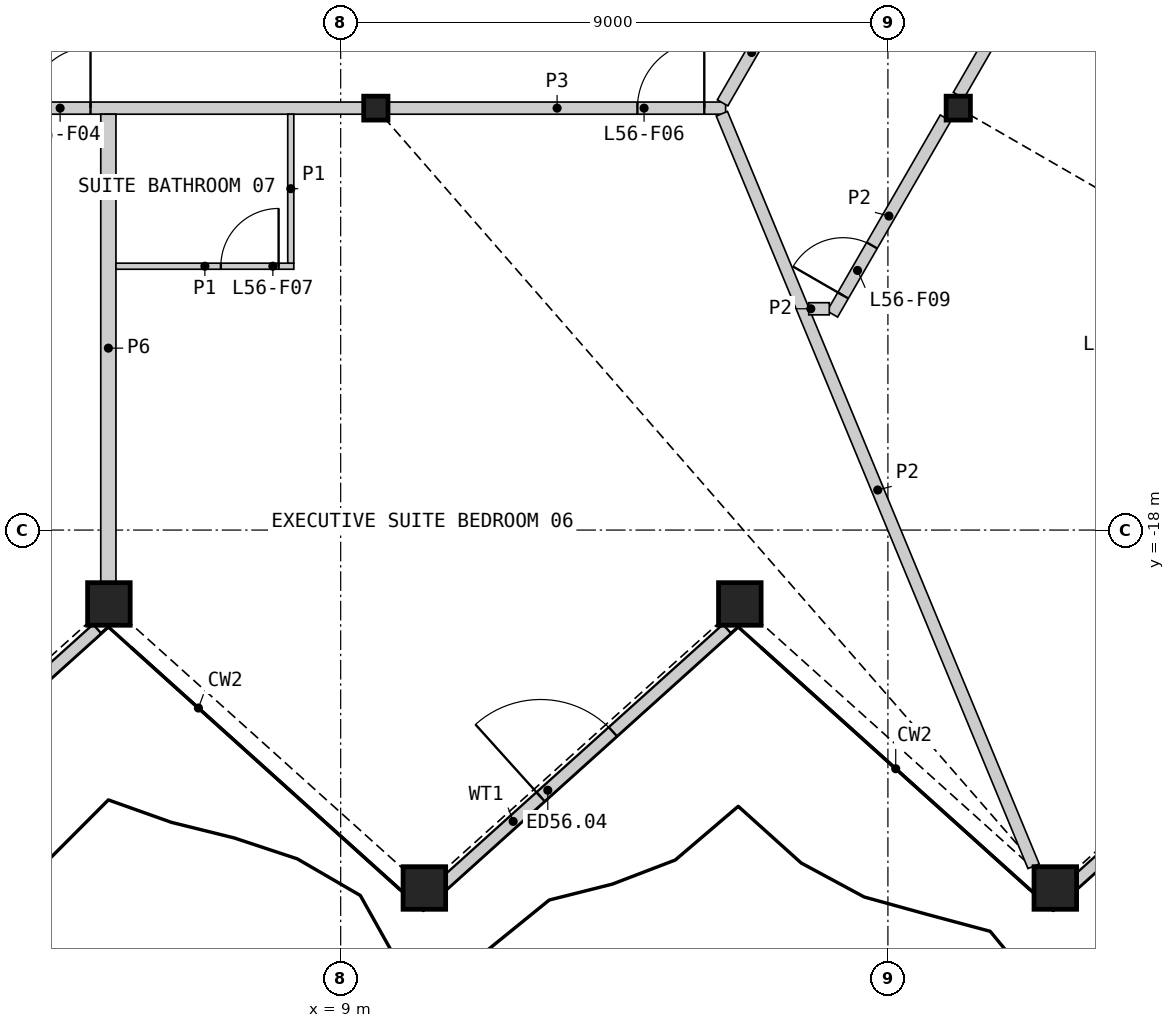
"""IFC4 building model, lengths in metres.
Left out: names, types, materials, properties, quantities, classifications, styles, units other than length and angle.
Written with IfcOpenShell. Run it as: python <this file> out.ifc"""

import sys

from ifc_helpers import new_model, si_unit, direction, frame, frame_2d, origin, origin_2d, place, context, subcontext, project, spatial, rectangle, hollow_rectangle, i_section, extrude, element, fill, save


model = new_model("IFC4")
c1 = context("Model", 3, precision=1e-05, world=origin(), true_north=direction((0.0, 1.0)))
c2 = subcontext(c1, "Body", "Model", "MODEL_VIEW")
j1 = project(units=[si_unit("LENGTHUNIT", "METRE"), si_unit("PLANEANGLEUNIT", "RADIAN")], contexts=[c1])
p1 = place(None, origin())
s1 = spatial("IfcSite", under=j1, at=p1, CompositionType="ELEMENT")
p2 = place(p1, origin())
s2 = spatial("IfcBuilding", under=s1, at=p2, CompositionType="ELEMENT")
p3 = place(p2, frame((0.0, 0.0, 252.6)))
s3 = spatial("IfcBuildingStorey", under=s2, at=p3, CompositionType="ELEMENT", Elevation=252.6)
for number, where, z_axis, x_axis in (
    (1, (5.188, -19.215, 0.0), (0.0, 0.0, 1.0), (1.0, 0.0, 0.0)),
    (2, (10.376, -23.887, 0.0), (0.0, 0.0, 1.0), (1.0, 0.0, 0.0)),
    (3, (15.565, -19.215, 0.0), (0.0, 0.0, 1.0), (1.0, 0.0, 0.0)),
    (4, (20.753, -23.887, 0.0), (0.0, 0.0, 1.0), (1.0, 0.0, 0.0)),
):
    element("IfcColumn", number, at=place(p3, frame(where, z_axis=z_axis, x_axis=x_axis)), inside=s3, PredefinedType="COLUMN", context=c2, shape_type="SweptSolid", body=[
        extrude(hollow_rectangle(XDim=0.7, YDim=0.7, WallThickness=0.045, at=origin_2d()), origin(), (0.0, 0.0, 1.0), 3.6),
    ])
for number, where, z_axis, x_axis in (
    (5, (9.578, -11.06, 0.0), (0.0, 0.0, 1.0), (1.0, 0.0, 0.0)),
    (6, (19.157, -11.06, 0.0), (0.0, 0.0, 1.0), (1.0, 0.0, 0.0)),
):
    element("IfcColumn", number, at=place(p3, frame(where, z_axis=z_axis, x_axis=x_axis)), inside=s3, PredefinedType="COLUMN", context=c2, shape_type="SweptSolid", body=[
        extrude(i_section(OverallWidth=0.399, OverallDepth=0.393, WebThickness=0.023, FlangeThickness=0.037, at=origin_2d()), origin(), (0.0, 0.0, 1.0), 3.6),
    ])
p4 = place(p3, frame((0.305, -23.848, 0.0), z_axis=(0.0, 0.0, 1.0), x_axis=(0.74314024121, 0.669135697668, 0.0)))
e7 = element("IfcWall", 7, at=p4, inside=s3, PredefinedType="SOLIDWALL", context=c2, shape_type="SweptSolid", body=[
    extrude(rectangle(XDim=6.311, YDim=0.2, at=frame_2d((3.156, 0.0))), origin(), (0.0, 0.0, 1.0), 2.701),
])
p5 = place(p4, frame((2.184, 0.0, 0.0)))
e8 = element("IfcOpeningElement", 8, at=p5, cuts=e7, PredefinedType="OPENING", context=c2, shape_type="SweptSolid", body=[
    extrude(rectangle(XDim=1.6, YDim=2.4, at=frame_2d((0.8, 1.2))), frame((0.0, 0.11, 0.0), z_axis=(0.0, -1.0, 0.0), x_axis=(1.0, 0.0, 0.0)), (0.0, 0.0, 1.0), 0.22),
])
p6 = place(p3, frame((10.664, -23.848, 0.0), z_axis=(0.0, 0.0, 1.0), x_axis=(0.74314024121, 0.669135697668, 0.0)))
e9 = element("IfcWall", 9, at=p6, inside=s3, PredefinedType="SOLIDWALL", context=c2, shape_type="SweptSolid", body=[
    extrude(rectangle(XDim=6.311, YDim=0.2, at=frame_2d((3.156, 0.0))), origin(), (0.0, 0.0, 1.0), 2.701),
])
p7 = place(p6, frame((2.184, 0.0, 0.0)))
e10 = element("IfcOpeningElement", 10, at=p7, cuts=e9, PredefinedType="OPENING", context=c2, shape_type="SweptSolid", body=[
    extrude(rectangle(XDim=1.6, YDim=2.4, at=frame_2d((0.8, 1.2))), frame((0.0, 0.11, 0.0), z_axis=(0.0, -1.0, 0.0), x_axis=(1.0, 0.0, 0.0)), (0.0, 0.0, 1.0), 0.22),
])
p8 = place(p3, frame((21.023, -23.848, 0.0), z_axis=(0.0, 0.0, 1.0), x_axis=(0.74314024121, 0.669135697668, 0.0)))
e11 = element("IfcWall", 11, at=p8, inside=s3, PredefinedType="SOLIDWALL", context=c2, shape_type="SweptSolid", body=[
    extrude(rectangle(XDim=6.311, YDim=0.2, at=frame_2d((3.156, 0.0))), origin(), (0.0, 0.0, 1.0), 2.701),
])
p9 = place(p8, frame((2.184, 0.0, 0.0)))
e12 = element("IfcOpeningElement", 12, at=p9, cuts=e11, PredefinedType="OPENING", context=c2, shape_type="SweptSolid", body=[
    extrude(rectangle(XDim=1.6, YDim=2.4, at=frame_2d((0.8, 1.2))), frame((0.0, 0.11, 0.0), z_axis=(0.0, -1.0, 0.0), x_axis=(1.0, 0.0, 0.0)), (0.0, 0.0, 1.0), 0.22),
])
p10 = place(p3, frame((0.209, -11.06, 0.0), z_axis=(0.0, 0.0, 1.0), x_axis=(1.0, 0.0, 0.0)))
e13 = element("IfcWall", 13, at=p10, inside=s3, PredefinedType="PARTITIONING", context=c2, shape_type="SweptSolid", body=[
    extrude(rectangle(XDim=9.159, YDim=0.2, at=frame_2d((4.58, 0.0))), origin(), (0.0, 0.0, 1.0), 3.25),
])
p11 = place(p10, frame((3.677, 0.0, 0.0)))
e14 = element("IfcOpeningElement", 14, at=p11, cuts=e13, PredefinedType="OPENING", context=c2, shape_type="SweptSolid", body=[
    extrude(rectangle(XDim=1.0, YDim=2.1, at=frame_2d((0.5, 1.05))), frame((0.0, 0.11, 0.0), z_axis=(0.0, -1.0, 0.0), x_axis=(1.0, 0.0, 0.0)), (0.0, 0.0, 1.0), 0.22),
])
p12 = place(p3, frame((5.179, -18.855, 0.0), z_axis=(0.0, 0.0, 1.0), x_axis=(0.0, 1.0, 0.0)))
e15 = element("IfcWall", 15, at=p12, inside=s3, PredefinedType="PARTITIONING", context=c2, shape_type="SweptSolid", body=[
    extrude(rectangle(XDim=7.695, YDim=0.25, at=frame_2d((3.848, 0.0))), origin(), (0.0, 0.0, 1.0), 2.404),
])
p13 = place(p3, frame((9.788, -11.06, 0.0), z_axis=(0.0, 0.0, 1.0), x_axis=(1.0, 0.0, 0.0)))
e16 = element("IfcWall", 16, at=p13, inside=s3, PredefinedType="PARTITIONING", context=c2, shape_type="SweptSolid", body=[
    extrude(rectangle(XDim=5.543, YDim=0.2, at=frame_2d((2.771, 0.0))), origin(), (0.0, 0.0, 1.0), 3.25),
])
p14 = place(p13, frame((4.092, 0.0, 0.0)))
e17 = element("IfcOpeningElement", 17, at=p14, cuts=e16, PredefinedType="OPENING", context=c2, shape_type="SweptSolid", body=[
    extrude(rectangle(XDim=1.1, YDim=2.1, at=frame_2d((0.55, 1.05))), frame((0.0, 0.11, 0.0), z_axis=(0.0, -1.0, 0.0), x_axis=(1.0, 0.0, 0.0)), (0.0, 0.0, 1.0), 0.22),
])
p15 = place(p3, frame((15.281, -10.974, 0.0), z_axis=(0.0, 0.0, 1.0), x_axis=(0.499989446428, 0.866031496806, 0.0)))
e18 = element("IfcWall", 18, at=p15, inside=s3, PredefinedType="PARTITIONING", context=c2, shape_type="SweptSolid", body=[
    extrude(rectangle(XDim=3.826, YDim=0.2, at=frame_2d((1.913, 0.0))), origin(), (0.0, 0.0, 1.0), 3.25),
])
p16 = place(p15, frame((1.386, 0.0, 0.0)))
e19 = element("IfcOpeningElement", 19, at=p16, cuts=e18, PredefinedType="OPENING", context=c2, shape_type="SweptSolid", body=[
    extrude(rectangle(XDim=0.95, YDim=2.1, at=frame_2d((0.475, 1.05))), frame((0.0, 0.11, 0.0), z_axis=(0.0, -1.0, 0.0), x_axis=(1.0, 0.0, 0.0)), (0.0, 0.0, 1.0), 0.22),
])
p17 = place(p3, frame((15.269, -11.153, 0.0), z_axis=(0.0, 0.0, 1.0), x_axis=(0.382692998932, -0.923875569851, 0.0)))
e20 = element("IfcWall", 20, at=p17, inside=s3, PredefinedType="PARTITIONING", context=c2, shape_type="SweptSolid", body=[
    extrude(rectangle(XDim=13.397, YDim=0.2, at=frame_2d((6.698, 0.0))), origin(), (0.0, 0.0, 1.0), 2.404),
])
p18 = place(p3, frame((19.162, -10.851, 0.0), z_axis=(0.0, 0.0, 1.0), x_axis=(0.500008654708, 0.866020406929, 0.0)))
e21 = element("IfcWall", 21, at=p18, inside=s3, PredefinedType="PARTITIONING", context=c2, shape_type="SweptSolid", body=[
    extrude(rectangle(XDim=6.67, YDim=0.2, at=frame_2d((3.335, 0.0))), origin(), (0.0, 0.0, 1.0), 2.404),
])
p19 = place(p3, frame((17.086, -14.447, 0.0), z_axis=(0.0, 0.0, 1.0), x_axis=(0.500004411858, 0.866022856582, 0.0)))
e22 = element("IfcWall", 22, at=p19, inside=s3, PredefinedType="PARTITIONING", context=c2, shape_type="SweptSolid", body=[
    extrude(rectangle(XDim=3.723, YDim=0.2, at=frame_2d((1.861, 0.0))), origin(), (0.0, 0.0, 1.0), 2.404),
])
p20 = place(p19, frame((0.353, 0.0, 0.0)))
e23 = element("IfcOpeningElement", 23, at=p20, cuts=e22, PredefinedType="OPENING", context=c2, shape_type="SweptSolid", body=[
    extrude(rectangle(XDim=0.95, YDim=2.1, at=frame_2d((0.475, 1.05))), frame((0.0, 0.11, 0.0), z_axis=(0.0, -1.0, 0.0), x_axis=(1.0, 0.0, 0.0)), (0.0, 0.0, 1.0), 0.22),
])
p21 = place(p3, frame((16.698, -14.36, 0.0), z_axis=(0.0, 0.0, 1.0), x_axis=(1.0, 0.0, 0.0)))
e24 = element("IfcWall", 24, at=p21, inside=s3, PredefinedType="PARTITIONING", context=c2, shape_type="SweptSolid", body=[
    extrude(rectangle(XDim=0.338, YDim=0.2, at=frame_2d((0.169, 0.0))), origin(), (0.0, 0.0, 1.0), 2.404),
])
p22 = place(p3, frame((5.304, -13.66, 0.0), z_axis=(0.0, 0.0, 1.0), x_axis=(1.0, 0.0, 0.0)))
e25 = element("IfcWall", 25, at=p22, inside=s3, PredefinedType="PARTITIONING", context=c2, shape_type="SweptSolid", body=[
    extrude(rectangle(XDim=2.925, YDim=0.1, at=frame_2d((1.462, 0.0))), origin(), (0.0, 0.0, 1.0), 2.404),
])
p23 = place(p22, frame((1.725, 0.0, 0.0)))
e26 = element("IfcOpeningElement", 26, at=p23, cuts=e25, PredefinedType="OPENING", context=c2, shape_type="SweptSolid", body=[
    extrude(rectangle(XDim=0.95, YDim=2.1, at=frame_2d((0.475, 1.05))), frame((0.0, 0.06, 0.0), z_axis=(0.0, -1.0, 0.0), x_axis=(1.0, 0.0, 0.0)), (0.0, 0.0, 1.0), 0.12),
])
p24 = place(p3, frame((8.179, -13.61, 0.0), z_axis=(0.0, 0.0, 1.0), x_axis=(0.0, 1.0, 0.0)))
e27 = element("IfcWall", 27, at=p24, inside=s3, PredefinedType="PARTITIONING", context=c2, shape_type="SweptSolid", body=[
    extrude(rectangle(XDim=2.45, YDim=0.1, at=frame_2d((1.225, 0.0))), origin(), (0.0, 0.0, 1.0), 2.404),
])
p25 = place(p7, origin())
e28 = element("IfcDoor", 28, at=p25, inside=s3, OperationType="DOUBLE_DOOR_SINGLE_SWING", PredefinedType="DOOR", context=c2, shape_type="SweptSolid", body=[
    extrude(rectangle(XDim=1.6, YDim=2.4, at=frame_2d((0.8, 1.2))), frame((0.0, 0.025, 0.0), z_axis=(0.0, -1.0, 0.0), x_axis=(1.0, 0.0, 0.0)), (0.0, 0.0, 1.0), 0.05),
])
fill(e10, e28)
p26 = place(p11, origin())
e29 = element("IfcDoor", 29, at=p26, inside=s3, OperationType="SINGLE_SWING_RIGHT", PredefinedType="DOOR", context=c2, shape_type="SweptSolid", body=[
    extrude(rectangle(XDim=1.0, YDim=2.1, at=frame_2d((0.5, 1.05))), frame((0.0, 0.025, 0.0), z_axis=(0.0, -1.0, 0.0), x_axis=(1.0, 0.0, 0.0)), (0.0, 0.0, 1.0), 0.05),
])
fill(e14, e29)
p27 = place(p14, origin())
e30 = element("IfcDoor", 30, at=p27, inside=s3, OperationType="SINGLE_SWING_RIGHT", PredefinedType="DOOR", context=c2, shape_type="SweptSolid", body=[
    extrude(rectangle(XDim=1.1, YDim=2.1, at=frame_2d((0.55, 1.05))), frame((0.0, 0.025, 0.0), z_axis=(0.0, -1.0, 0.0), x_axis=(1.0, 0.0, 0.0)), (0.0, 0.0, 1.0), 0.05),
])
fill(e17, e30)
p28 = place(p23, origin())
e31 = element("IfcDoor", 31, at=p28, inside=s3, OperationType="SINGLE_SWING_RIGHT", PredefinedType="DOOR", context=c2, shape_type="SweptSolid", body=[
    extrude(rectangle(XDim=0.95, YDim=2.1, at=frame_2d((0.475, 1.05))), frame((0.0, 0.025, 0.0), z_axis=(0.0, -1.0, 0.0), x_axis=(1.0, 0.0, 0.0)), (0.0, 0.0, 1.0), 0.05),
])
fill(e26, e31)
p29 = place(p20, origin())
e32 = element("IfcDoor", 32, at=p29, inside=s3, OperationType="SINGLE_SWING_LEFT", PredefinedType="DOOR", context=c2, shape_type="SweptSolid", body=[
    extrude(rectangle(XDim=0.95, YDim=2.1, at=frame_2d((0.475, 1.05))), frame((0.0, 0.025, 0.0), z_axis=(0.0, -1.0, 0.0), x_axis=(1.0, 0.0, 0.0)), (0.0, 0.0, 1.0), 0.05),
])
fill(e23, e32)
save(model, sys.argv[1])
